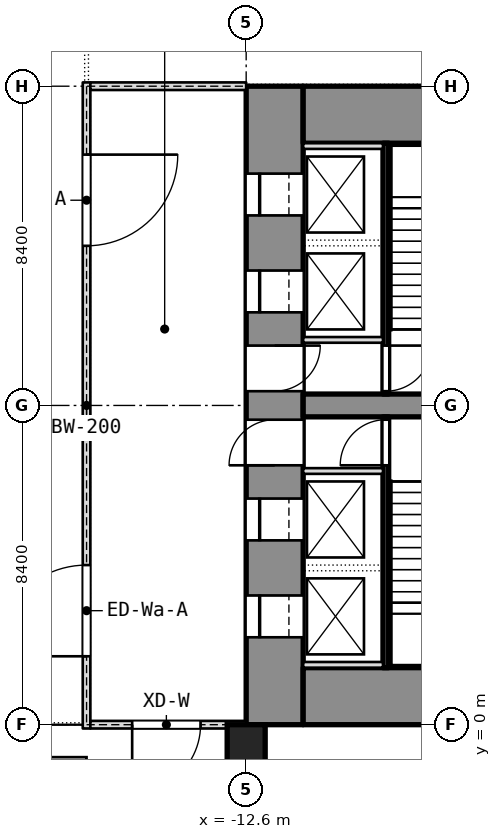
"""IFC4 building model, lengths in metres.
Left out: names, types, materials, properties, quantities, classifications, styles, units other than length and angle.
Written with IfcOpenShell. Run it as: python <this file> out.ifc"""

import sys

from ifc_helpers import new_model, si_unit, direction, frame, frame_2d, origin, origin_2d, place, context, subcontext, project, spatial, rectangle, extrude, element, fill, save


model = new_model("IFC4")
c1 = context("Model", 3, precision=1e-05, world=origin(), true_north=direction((0.0, 1.0)))
c2 = subcontext(c1, "Body", "Model", "MODEL_VIEW")
j1 = project(units=[si_unit("LENGTHUNIT", "METRE"), si_unit("PLANEANGLEUNIT", "RADIAN")], contexts=[c1])
p1 = place(None, origin())
s1 = spatial("IfcSite", under=j1, at=p1, CompositionType="ELEMENT")
p2 = place(p1, origin())
s2 = spatial("IfcBuilding", under=s1, at=p2, CompositionType="ELEMENT")
p3 = place(p2, origin())
s3 = spatial("IfcBuildingStorey", under=s2, at=p3, CompositionType="ELEMENT", Elevation=0.0)
p4 = place(p3, frame((-11.85, 0.0, -0.3), z_axis=(0.0, 0.0, 1.0), x_axis=(0.0, 1.0, 0.0)))
e1 = element("IfcWall", 1, at=p4, inside=s3, PredefinedType="SHEAR", context=c2, shape_type="SweptSolid", body=[
    extrude(rectangle(XDim=16.8, YDim=1.5, at=frame_2d((8.4, 0.0))), origin(), (0.0, 0.0, 1.0), 8.3),
])
p5 = place(p4, frame((2.3, 0.0, 0.3)))
e2 = element("IfcOpeningElement", 2, at=p5, cuts=e1, PredefinedType="OPENING", context=c2, shape_type="SweptSolid", body=[
    extrude(rectangle(XDim=1.1, YDim=2.1, at=frame_2d((0.55, 1.05))), frame((0.0, 0.75, 0.0), z_axis=(0.0, -1.0, 0.0), x_axis=(1.0, 0.0, 0.0)), (0.0, 0.0, 1.0), 1.5),
])
p6 = place(p4, frame((4.85, 0.0, 0.3)))
e3 = element("IfcOpeningElement", 3, at=p6, cuts=e1, PredefinedType="OPENING", context=c2, shape_type="SweptSolid", body=[
    extrude(rectangle(XDim=1.1, YDim=2.1, at=frame_2d((0.55, 1.05))), frame((0.0, 0.75, 0.0), z_axis=(0.0, -1.0, 0.0), x_axis=(1.0, 0.0, 0.0)), (0.0, 0.0, 1.0), 1.5),
])
p7 = place(p4, frame((6.825, 0.0, 0.3)))
e4 = element("IfcOpeningElement", 4, at=p7, cuts=e1, PredefinedType="OPENING", context=c2, shape_type="SweptSolid", body=[
    extrude(rectangle(XDim=1.2, YDim=2.1, at=frame_2d((0.6, 1.05))), frame((0.0, 0.75, 0.0), z_axis=(0.0, -1.0, 0.0), x_axis=(1.0, 0.0, 0.0)), (0.0, 0.0, 1.0), 1.5),
])
p8 = place(p4, frame((13.4, 0.0, 0.3)))
e5 = element("IfcOpeningElement", 5, at=p8, cuts=e1, PredefinedType="OPENING", context=c2, shape_type="SweptSolid", body=[
    extrude(rectangle(XDim=1.1, YDim=2.1, at=frame_2d((0.55, 1.05))), frame((0.0, 0.75, 0.0), z_axis=(0.0, -1.0, 0.0), x_axis=(1.0, 0.0, 0.0)), (0.0, 0.0, 1.0), 1.5),
])
p9 = place(p4, frame((10.85, 0.0, 0.3)))
e6 = element("IfcOpeningElement", 6, at=p9, cuts=e1, PredefinedType="OPENING", context=c2, shape_type="SweptSolid", body=[
    extrude(rectangle(XDim=1.1, YDim=2.1, at=frame_2d((0.55, 1.05))), frame((0.0, 0.75, 0.0), z_axis=(0.0, -1.0, 0.0), x_axis=(1.0, 0.0, 0.0)), (0.0, 0.0, 1.0), 1.5),
])
p10 = place(p4, frame((8.775, 0.0, 0.3)))
e7 = element("IfcOpeningElement", 7, at=p10, cuts=e1, PredefinedType="OPENING", context=c2, shape_type="SweptSolid", body=[
    extrude(rectangle(XDim=1.2, YDim=2.1, at=frame_2d((0.6, 1.05))), frame((0.0, 0.75, 0.0), z_axis=(0.0, -1.0, 0.0), x_axis=(1.0, 0.0, 0.0)), (0.0, 0.0, 1.0), 1.5),
])
p11 = place(p3, frame((-11.1, 0.75, -0.3), z_axis=(0.0, 0.0, 1.0), x_axis=(1.0, 0.0, 0.0)))
e8 = element("IfcWall", 8, at=p11, inside=s3, PredefinedType="SHEAR", context=c2, shape_type="SweptSolid", body=[
    extrude(rectangle(XDim=22.2, YDim=1.5, at=frame_2d((11.1, 0.0))), origin(), (0.0, 0.0, 1.0), 8.3),
])
p12 = place(p11, frame((3.525, 0.0, 0.3)))
e9 = element("IfcOpeningElement", 9, at=p12, cuts=e8, PredefinedType="OPENING", context=c2, shape_type="SweptSolid", body=[
    extrude(rectangle(XDim=1.8, YDim=2.1, at=frame_2d((0.9, 1.05))), frame((0.0, 0.75, 0.0), z_axis=(0.0, -1.0, 0.0), x_axis=(1.0, 0.0, 0.0)), (0.0, 0.0, 1.0), 1.5),
])
p13 = place(p11, frame((16.875, 0.0, 0.3)))
e10 = element("IfcOpeningElement", 10, at=p13, cuts=e8, PredefinedType="OPENING", context=c2, shape_type="SweptSolid", body=[
    extrude(rectangle(XDim=1.8, YDim=2.1, at=frame_2d((0.9, 1.05))), frame((0.0, 0.75, 0.0), z_axis=(0.0, -1.0, 0.0), x_axis=(1.0, 0.0, 0.0)), (0.0, 0.0, 1.0), 1.5),
])
p14 = place(p3, frame((-11.1, 16.05, -0.3), z_axis=(0.0, 0.0, 1.0), x_axis=(1.0, 0.0, 0.0)))
e11 = element("IfcWall", 11, at=p14, inside=s3, PredefinedType="SHEAR", context=c2, shape_type="SweptSolid", body=[
    extrude(rectangle(XDim=22.2, YDim=1.5, at=frame_2d((11.1, 0.0))), origin(), (0.0, 0.0, 1.0), 8.3),
])
p15 = place(p3, frame((-11.1, 8.4, -0.3), z_axis=(0.0, 0.0, 1.0), x_axis=(1.0, 0.0, 0.0)))
e12 = element("IfcWall", 12, at=p15, inside=s3, PredefinedType="SHEAR", context=c2, shape_type="SweptSolid", body=[
    extrude(rectangle(XDim=6.6, YDim=0.6, at=frame_2d((3.3, 0.0))), origin(), (0.0, 0.0, 1.0), 8.3),
])
p16 = place(p3, frame((-12.6, -0.5, -0.3), z_axis=(0.0, 0.0, 1.0), x_axis=(1.0, 0.0, 0.0)))
e13 = element("IfcColumn", 13, at=p16, inside=s3, PredefinedType="COLUMN", context=c2, shape_type="SweptSolid", body=[
    extrude(rectangle(XDim=1.0, YDim=1.0, at=origin_2d()), origin(), (0.0, 0.0, 1.0), 8.3),
])
p17 = place(p3, frame((-8.925, 1.5, 0.0), z_axis=(0.0, 0.0, 1.0), x_axis=(0.0, 1.0, 0.0)))
e14 = element("IfcWall", 14, at=p17, inside=s3, PredefinedType="SHEAR", context=c2, shape_type="SweptSolid", body=[
    extrude(rectangle(XDim=6.6, YDim=0.15, at=frame_2d((3.3, 0.0))), origin(), (0.0, 0.0, 1.0), 7.78),
])
p18 = place(p17, frame((5.325, 0.0, 0.0)))
e15 = element("IfcOpeningElement", 15, at=p18, cuts=e14, PredefinedType="OPENING", context=c2, shape_type="SweptSolid", body=[
    extrude(rectangle(XDim=1.2, YDim=2.1, at=frame_2d((0.6, 1.05))), frame((0.0, 0.075, 0.0), z_axis=(0.0, -1.0, 0.0), x_axis=(1.0, 0.0, 0.0)), (0.0, 0.0, 1.0), 0.15),
])
for number, where, z_axis, x_axis in (
    (16, (-11.1, 6.675, -0.3), (0.0, 0.0, 1.0), (1.0, 0.0, 0.0)),
    (17, (-11.1, 1.575, -0.3), (0.0, 0.0, 1.0), (1.0, 0.0, 0.0)),
):
    element("IfcWall", number, at=place(p3, frame(where, z_axis=z_axis, x_axis=x_axis)), inside=s3, PredefinedType="SHEAR", context=c2, shape_type="SweptSolid", body=[
        extrude(rectangle(XDim=2.1, YDim=0.15, at=frame_2d((1.05, 0.0))), origin(), (0.0, 0.0, 1.0), 8.3),
    ])
p19 = place(p3, frame((-8.925, 8.7, 0.0), z_axis=(0.0, 0.0, 1.0), x_axis=(0.0, 1.0, 0.0)))
e18 = element("IfcWall", 18, at=p19, inside=s3, PredefinedType="SHEAR", context=c2, shape_type="SweptSolid", body=[
    extrude(rectangle(XDim=6.6, YDim=0.15, at=frame_2d((3.3, 0.0))), origin(), (0.0, 0.0, 1.0), 7.78),
])
p20 = place(p19, frame((0.075, 0.0, 0.0)))
e19 = element("IfcOpeningElement", 19, at=p20, cuts=e18, PredefinedType="OPENING", context=c2, shape_type="SweptSolid", body=[
    extrude(rectangle(XDim=1.2, YDim=2.1, at=frame_2d((0.6, 1.05))), frame((0.0, 0.075, 0.0), z_axis=(0.0, -1.0, 0.0), x_axis=(1.0, 0.0, 0.0)), (0.0, 0.0, 1.0), 0.15),
])
for number, where, z_axis, x_axis in (
    (20, (-11.1, 10.125, -0.3), (0.0, 0.0, 1.0), (1.0, 0.0, 0.0)),
    (21, (-11.1, 15.225, -0.3), (0.0, 0.0, 1.0), (1.0, 0.0, 0.0)),
):
    element("IfcWall", number, at=place(p3, frame(where, z_axis=z_axis, x_axis=x_axis)), inside=s3, PredefinedType="SHEAR", context=c2, shape_type="SweptSolid", body=[
        extrude(rectangle(XDim=2.1, YDim=0.15, at=frame_2d((1.05, 0.0))), origin(), (0.0, 0.0, 1.0), 8.3),
    ])
p21 = place(p3, frame((-16.8, -0.1, 0.0), z_axis=(0.0, 0.0, 1.0), x_axis=(0.0, 1.0, 0.0)))
e22 = element("IfcWall", 22, at=p21, inside=s3, PredefinedType="PARTITIONING", context=c2, shape_type="SweptSolid", body=[
    extrude(rectangle(XDim=17.0, YDim=0.2, at=frame_2d((8.5, 0.0))), origin(), (0.0, 0.0, 1.0), 7.78),
])
p22 = place(p21, frame((1.9, 0.0, 0.0)))
e23 = element("IfcOpeningElement", 23, at=p22, cuts=e22, PredefinedType="OPENING", context=c2, shape_type="SweptSolid", body=[
    extrude(rectangle(XDim=2.4, YDim=2.1, at=frame_2d((1.2, 1.05))), frame((0.0, 0.1, 0.0), z_axis=(0.0, -1.0, 0.0), x_axis=(1.0, 0.0, 0.0)), (0.0, 0.0, 1.0), 0.2),
])
p23 = place(p21, frame((12.7, 0.0, 0.0)))
e24 = element("IfcOpeningElement", 24, at=p23, cuts=e22, PredefinedType="OPENING", context=c2, shape_type="SweptSolid", body=[
    extrude(rectangle(XDim=2.4, YDim=2.1, at=frame_2d((1.2, 1.05))), frame((0.0, 0.1, 0.0), z_axis=(0.0, -1.0, 0.0), x_axis=(1.0, 0.0, 0.0)), (0.0, 0.0, 1.0), 0.2),
])
p24 = place(p3, frame((-16.7, 0.0, 0.0), z_axis=(0.0, 0.0, 1.0), x_axis=(1.0, 0.0, 0.0)))
e25 = element("IfcWall", 25, at=p24, inside=s3, PredefinedType="PARTITIONING", context=c2, shape_type="SweptSolid", body=[
    extrude(rectangle(XDim=4.1, YDim=0.2, at=frame_2d((2.05, 0.0))), origin(), (0.0, 0.0, 1.0), 7.78),
])
p25 = place(p24, frame((1.1, 0.0, 0.0)))
e26 = element("IfcOpeningElement", 26, at=p25, cuts=e25, PredefinedType="OPENING", context=c2, shape_type="SweptSolid", body=[
    extrude(rectangle(XDim=1.8, YDim=2.1, at=frame_2d((0.9, 1.05))), frame((0.0, 0.1, 0.0), z_axis=(0.0, -1.0, 0.0), x_axis=(1.0, 0.0, 0.0)), (0.0, 0.0, 1.0), 0.2),
])
p26 = place(p3, frame((-16.7, 16.8, 0.0), z_axis=(0.0, 0.0, 1.0), x_axis=(1.0, 0.0, 0.0)))
e27 = element("IfcWall", 27, at=p26, inside=s3, PredefinedType="PARTITIONING", context=c2, shape_type="SweptSolid", body=[
    extrude(rectangle(XDim=4.1, YDim=0.2, at=frame_2d((2.05, 0.0))), origin(), (0.0, 0.0, 1.0), 7.78),
])
p27 = place(p5, origin())
e28 = element("IfcDoor", 28, at=p27, inside=s3, OperationType="SLIDING_TO_LEFT", PredefinedType="DOOR", context=c2, shape_type="SweptSolid", body=[
    extrude(rectangle(XDim=1.1, YDim=2.1, at=frame_2d((0.55, 1.05))), frame((0.0, 0.025, 0.0), z_axis=(0.0, -1.0, 0.0), x_axis=(1.0, 0.0, 0.0)), (0.0, 0.0, 1.0), 0.05),
])
fill(e2, e28)
p28 = place(p6, origin())
e29 = element("IfcDoor", 29, at=p28, inside=s3, OperationType="SLIDING_TO_LEFT", PredefinedType="DOOR", context=c2, shape_type="SweptSolid", body=[
    extrude(rectangle(XDim=1.1, YDim=2.1, at=frame_2d((0.55, 1.05))), frame((0.0, 0.025, 0.0), z_axis=(0.0, -1.0, 0.0), x_axis=(1.0, 0.0, 0.0)), (0.0, 0.0, 1.0), 0.05),
])
fill(e3, e29)
p29 = place(p7, origin())
e30 = element("IfcDoor", 30, at=p29, inside=s3, OperationType="SINGLE_SWING_LEFT", PredefinedType="DOOR", context=c2, shape_type="SweptSolid", body=[
    extrude(rectangle(XDim=1.2, YDim=2.1, at=frame_2d((0.6, 1.05))), frame((0.0, 0.025, 0.0), z_axis=(0.0, -1.0, 0.0), x_axis=(1.0, 0.0, 0.0)), (0.0, 0.0, 1.0), 0.05),
])
fill(e4, e30)
p30 = place(p18, origin())
e31 = element("IfcDoor", 31, at=p30, inside=s3, OperationType="SINGLE_SWING_LEFT", PredefinedType="DOOR", context=c2, shape_type="SweptSolid", body=[
    extrude(rectangle(XDim=1.2, YDim=2.1, at=frame_2d((0.6, 1.05))), frame((0.0, 0.025, 0.0), z_axis=(0.0, -1.0, 0.0), x_axis=(1.0, 0.0, 0.0)), (0.0, 0.0, 1.0), 0.05),
])
fill(e15, e31)
p31 = place(p8, origin())
e32 = element("IfcDoor", 32, at=p31, inside=s3, OperationType="SLIDING_TO_LEFT", PredefinedType="DOOR", context=c2, shape_type="SweptSolid", body=[
    extrude(rectangle(XDim=1.1, YDim=2.1, at=frame_2d((0.55, 1.05))), frame((0.0, 0.025, 0.0), z_axis=(0.0, -1.0, 0.0), x_axis=(1.0, 0.0, 0.0)), (0.0, 0.0, 1.0), 0.05),
])
fill(e5, e32)
p32 = place(p9, origin())
e33 = element("IfcDoor", 33, at=p32, inside=s3, OperationType="SLIDING_TO_LEFT", PredefinedType="DOOR", context=c2, shape_type="SweptSolid", body=[
    extrude(rectangle(XDim=1.1, YDim=2.1, at=frame_2d((0.55, 1.05))), frame((0.0, 0.025, 0.0), z_axis=(0.0, -1.0, 0.0), x_axis=(1.0, 0.0, 0.0)), (0.0, 0.0, 1.0), 0.05),
])
fill(e6, e33)
p33 = place(p10, origin())
e34 = element("IfcDoor", 34, at=p33, inside=s3, OperationType="SINGLE_SWING_LEFT", PredefinedType="DOOR", context=c2, shape_type="SweptSolid", body=[
    extrude(rectangle(XDim=1.2, YDim=2.1, at=frame_2d((0.6, 1.05))), frame((0.0, 0.025, 0.0), z_axis=(0.0, -1.0, 0.0), x_axis=(1.0, 0.0, 0.0)), (0.0, 0.0, 1.0), 0.05),
])
fill(e7, e34)
p34 = place(p20, origin())
e35 = element("IfcDoor", 35, at=p34, inside=s3, OperationType="SINGLE_SWING_LEFT", PredefinedType="DOOR", context=c2, shape_type="SweptSolid", body=[
    extrude(rectangle(XDim=1.2, YDim=2.1, at=frame_2d((0.6, 1.05))), frame((0.0, 0.025, 0.0), z_axis=(0.0, -1.0, 0.0), x_axis=(1.0, 0.0, 0.0)), (0.0, 0.0, 1.0), 0.05),
])
fill(e19, e35)
p35 = place(p22, origin())
e36 = element("IfcDoor", 36, at=p35, inside=s3, OperationType="DOUBLE_DOOR_SINGLE_SWING", PredefinedType="DOOR", context=c2, shape_type="SweptSolid", body=[
    extrude(rectangle(XDim=2.4, YDim=2.1, at=frame_2d((1.2, 1.05))), frame((0.0, 0.025, 0.0), z_axis=(0.0, -1.0, 0.0), x_axis=(1.0, 0.0, 0.0)), (0.0, 0.0, 1.0), 0.05),
])
fill(e23, e36)
p36 = place(p23, origin())
e37 = element("IfcDoor", 37, at=p36, inside=s3, OperationType="DOUBLE_DOOR_SINGLE_SWING", PredefinedType="DOOR", context=c2, shape_type="SweptSolid", body=[
    extrude(rectangle(XDim=2.4, YDim=2.1, at=frame_2d((1.2, 1.05))), frame((0.0, 0.025, 0.0), z_axis=(0.0, -1.0, 0.0), x_axis=(1.0, 0.0, 0.0)), (0.0, 0.0, 1.0), 0.05),
])
fill(e24, e37)
p37 = place(p25, frame((1.8, 0.0, 0.0), z_axis=(0.0, 0.0, 1.0), x_axis=(-1.0, 0.0, 0.0)))
e38 = element("IfcDoor", 38, at=p37, inside=s3, OperationType="DOUBLE_DOOR_SINGLE_SWING", PredefinedType="DOOR", context=c2, shape_type="SweptSolid", body=[
    extrude(rectangle(XDim=1.8, YDim=2.1, at=frame_2d((0.9, 1.05))), frame((0.0, 0.025, 0.0), z_axis=(0.0, -1.0, 0.0), x_axis=(1.0, 0.0, 0.0)), (0.0, 0.0, 1.0), 0.05),
])
fill(e26, e38)
save(model, sys.argv[1])
